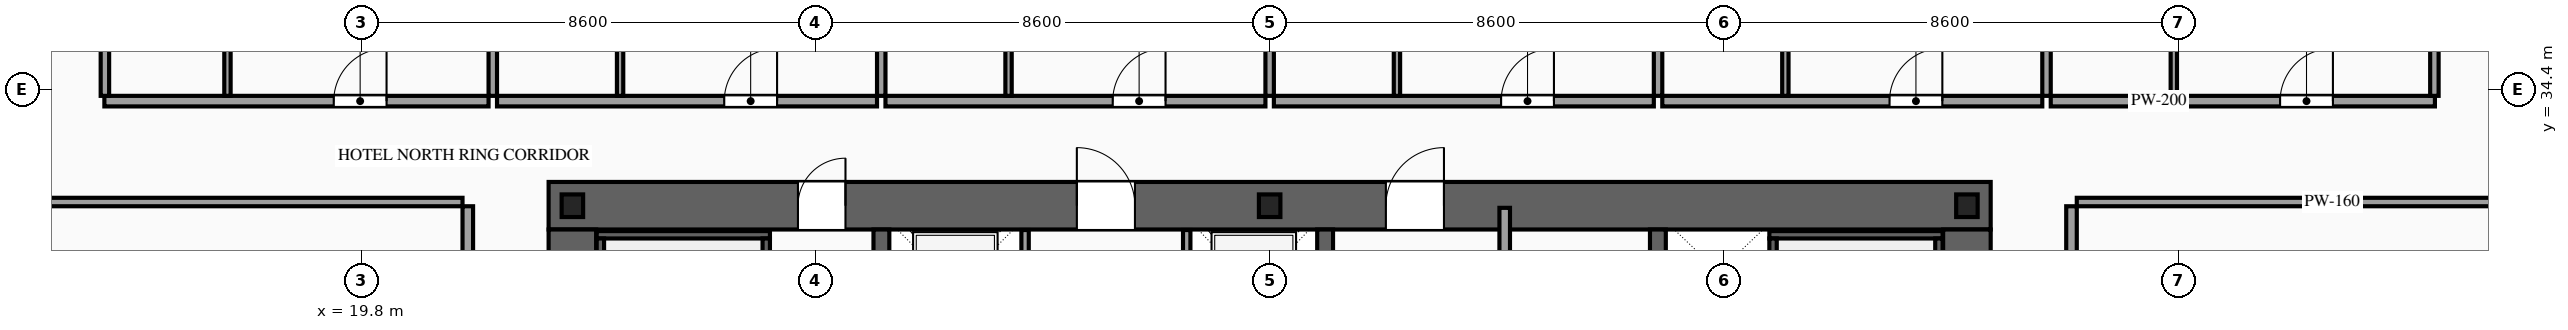
"""IFC4 building model, lengths in metres.
Left out: names, types, materials, properties, quantities, classifications, styles, units other than length and angle.
Written with IfcOpenShell. Run it as: python <this file> out.ifc"""

import sys

from ifc_helpers import new_model, si_unit, direction, frame, frame_2d, origin, origin_2d, place, context, subcontext, project, spatial, rectangle, i_section, extrude, source, transform, mapped, element, fill, save


model = new_model("IFC4")
c1 = context("Model", 3, precision=1e-05, world=origin(), true_north=direction((0.0, 1.0)))
c2 = subcontext(c1, "Body", "Model", "MODEL_VIEW")
j1 = project(units=[si_unit("LENGTHUNIT", "METRE"), si_unit("PLANEANGLEUNIT", "RADIAN")], contexts=[c1])
p1 = place(None, origin())
s1 = spatial("IfcSite", under=j1, at=p1, CompositionType="ELEMENT")
p2 = place(p1, origin())
s2 = spatial("IfcBuilding", under=s1, at=p2, CompositionType="ELEMENT")
p3 = place(p2, frame((0.0, 0.0, 34.2)))
s3 = spatial("IfcBuildingStorey", under=s2, at=p3, CompositionType="ELEMENT", Elevation=34.2)
p4 = place(p3, frame((23.35, 32.2, 0.0), z_axis=(0.0, 0.0, 1.0), x_axis=(1.0, 0.0, 0.0)))
e1 = element("IfcWall", 1, at=p4, inside=s3, PredefinedType="SHEAR", context=c2, shape_type="SweptSolid", body=[
    extrude(rectangle(XDim=27.3, YDim=0.9, at=frame_2d((13.65, 0.0))), origin(), (0.0, 0.0, 1.0), 3.6),
])
p5 = place(p4, frame((4.72, 0.0, 0.0)))
e2 = element("IfcOpeningElement", 2, at=p5, cuts=e1, PredefinedType="OPENING", context=c2, shape_type="SweptSolid", body=[
    extrude(rectangle(XDim=0.9, YDim=2.15, at=frame_2d((0.45, 1.075))), frame((0.0, 0.465, 0.0), z_axis=(0.0, -1.0, 0.0), x_axis=(1.0, 0.0, 0.0)), (0.0, 0.0, 1.0), 0.93),
])
p6 = place(p4, frame((10.0, 0.0, 0.0)))
e3 = element("IfcOpeningElement", 3, at=p6, cuts=e1, PredefinedType="OPENING", context=c2, shape_type="SweptSolid", body=[
    extrude(rectangle(XDim=1.1, YDim=2.2, at=frame_2d((0.55, 1.1))), frame((0.0, 0.465, 0.0), z_axis=(0.0, -1.0, 0.0), x_axis=(1.0, 0.0, 0.0)), (0.0, 0.0, 1.0), 0.93),
])
p7 = place(p4, frame((15.85, 0.0, 0.0)))
e4 = element("IfcOpeningElement", 4, at=p7, cuts=e1, PredefinedType="OPENING", context=c2, shape_type="SweptSolid", body=[
    extrude(rectangle(XDim=1.1, YDim=2.2, at=frame_2d((0.55, 1.1))), frame((0.0, 0.465, 0.0), z_axis=(0.0, -1.0, 0.0), x_axis=(1.0, 0.0, 0.0)), (0.0, 0.0, 1.0), 0.93),
])
m1 = source(origin(), c2, "Body", "SweptSolid", [
    extrude(rectangle(XDim=11.9, YDim=0.9, at=frame_2d((5.95, 0.0))), origin(), (0.0, 0.0, 1.0), 3.6),
])
for number, where, z_axis, x_axis in (
    (5, (23.8, 19.85, 0.0), (0.0, 0.0, 1.0), (0.0, 1.0, 0.0)),
    (6, (50.2, 19.85, 0.0), (0.0, 0.0, 1.0), (0.0, 1.0, 0.0)),
):
    element("IfcWall", number, at=place(p3, frame(where, z_axis=z_axis, x_axis=x_axis)), inside=s3, PredefinedType="SHEAR", context=c2, shape_type="MappedRepresentation", body=[
        mapped(m1, transform((0.0, 0.0, 0.0), scale=1.0)),
    ])
m2 = source(origin(), c2, "Body", "SweptSolid", [
    extrude(rectangle(XDim=11.9, YDim=0.3, at=frame_2d((5.95, 0.0))), origin(), (0.0, 0.0, 1.0), 3.6),
])
for number, where, z_axis, x_axis in (
    (7, (29.65, 19.85, 0.0), (0.0, 0.0, 1.0), (0.0, 1.0, 0.0)),
    (8, (38.05, 19.85, 0.0), (0.0, 0.0, 1.0), (0.0, 1.0, 0.0)),
    (9, (44.35, 19.85, 0.0), (0.0, 0.0, 1.0), (0.0, 1.0, 0.0)),
):
    element("IfcWall", number, at=place(p3, frame(where, z_axis=z_axis, x_axis=x_axis)), inside=s3, PredefinedType="SOLIDWALL", context=c2, shape_type="MappedRepresentation", body=[
        mapped(m2, transform((0.0, 0.0, 0.0), scale=1.0)),
    ])
m3 = source(origin(), c2, "Body", "SweptSolid", [
    extrude(i_section(OverallWidth=0.407, OverallDepth=0.428, WebThickness=0.02, FlangeThickness=0.035, at=origin_2d()), origin(), (0.0, 0.0, 1.0), 3.6),
])
for number, where, z_axis, x_axis in (
    (10, (23.8, 32.2, 0.0), (0.0, 0.0, 1.0), (1.0, 0.0, 0.0)),
    (11, (37.0, 32.2, 0.0), (0.0, 0.0, 1.0), (1.0, 0.0, 0.0)),
    (12, (50.2, 32.2, 0.0), (0.0, 0.0, 1.0), (1.0, 0.0, 0.0)),
):
    element("IfcColumn", number, at=place(p3, frame(where, z_axis=z_axis, x_axis=x_axis)), inside=s3, PredefinedType="COLUMN", context=c2, shape_type="MappedRepresentation", body=[
        mapped(m3, transform((0.0, 0.0, 0.0), scale=1.0)),
    ])
p8 = place(p3, frame((32.37, 29.4, 0.0), z_axis=(0.0, 0.0, 1.0), x_axis=(0.0, 1.0, 0.0)))
e13 = element("IfcWall", 13, at=p8, inside=s3, PredefinedType="SOLIDWALL", context=c2, shape_type="SweptSolid", body=[
    extrude(rectangle(XDim=2.34, YDim=0.14, at=frame_2d((1.17, 0.0))), origin(), (0.0, 0.0, 1.0), 3.38),
])
p9 = place(p8, frame((0.62, 0.0, 0.0)))
e14 = element("IfcOpeningElement", 14, at=p9, cuts=e13, PredefinedType="OPENING", context=c2, shape_type="SweptSolid", body=[
    extrude(rectangle(XDim=1.1, YDim=2.2, at=frame_2d((0.55, 1.1))), frame((0.0, 0.085, 0.0), z_axis=(0.0, -1.0, 0.0), x_axis=(1.0, 0.0, 0.0)), (0.0, 0.0, 1.0), 0.17),
])
p10 = place(p3, frame((35.43, 29.4, 0.0), z_axis=(0.0, 0.0, 1.0), x_axis=(0.0, 1.0, 0.0)))
e15 = element("IfcWall", 15, at=p10, inside=s3, PredefinedType="SOLIDWALL", context=c2, shape_type="SweptSolid", body=[
    extrude(rectangle(XDim=2.34, YDim=0.14, at=frame_2d((1.17, 0.0))), origin(), (0.0, 0.0, 1.0), 3.38),
])
p11 = place(p10, frame((0.62, 0.0, 0.0)))
e16 = element("IfcOpeningElement", 16, at=p11, cuts=e15, PredefinedType="OPENING", context=c2, shape_type="SweptSolid", body=[
    extrude(rectangle(XDim=1.1, YDim=2.2, at=frame_2d((0.55, 1.1))), frame((0.0, 0.085, 0.0), z_axis=(0.0, -1.0, 0.0), x_axis=(1.0, 0.0, 0.0)), (0.0, 0.0, 1.0), 0.17),
])
m4 = source(origin(), c2, "Body", "SweptSolid", [
    extrude(rectangle(XDim=3.28, YDim=0.14, at=frame_2d((1.64, 0.0))), origin(), (0.0, 0.0, 1.0), 3.38),
])
p12 = place(p3, frame((24.26, 31.65, 0.0), z_axis=(0.0, 0.0, 1.0), x_axis=(1.0, 0.0, 0.0)))
e17 = element("IfcWall", 17, at=p12, inside=s3, PredefinedType="SOLIDWALL", context=c2, shape_type="MappedRepresentation", body=[
    mapped(m4, transform((0.0, 0.0, 0.0), scale=1.0)),
])
m5 = source(origin(), c2, "Body", "SweptSolid", [
    extrude(rectangle(XDim=8.94, YDim=0.14, at=frame_2d((4.47, 0.0))), origin(), (0.0, 0.0, 1.0), 3.38),
])
for number, where, z_axis, x_axis in (
    (18, (24.33, 22.64, 0.0), (0.0, 0.0, 1.0), (0.0, 1.0, 0.0)),
    (19, (27.47, 22.64, 0.0), (0.0, 0.0, 1.0), (0.0, 1.0, 0.0)),
):
    element("IfcWall", number, at=place(p3, frame(where, z_axis=z_axis, x_axis=x_axis)), inside=s3, PredefinedType="SOLIDWALL", context=c2, shape_type="MappedRepresentation", body=[
        mapped(m5, transform((0.0, 0.0, 0.0), scale=1.0)),
    ])
p13 = place(p3, frame((46.46, 31.65, 0.0), z_axis=(0.0, 0.0, 1.0), x_axis=(1.0, 0.0, 0.0)))
e20 = element("IfcWall", 20, at=p13, inside=s3, PredefinedType="SOLIDWALL", context=c2, shape_type="MappedRepresentation", body=[
    mapped(m4, transform((0.0, 0.0, 0.0), scale=1.0)),
])
for number, where, z_axis, x_axis in (
    (21, (46.53, 22.64, 0.0), (0.0, 0.0, 1.0), (0.0, 1.0, 0.0)),
    (22, (49.67, 22.64, 0.0), (0.0, 0.0, 1.0), (0.0, 1.0, 0.0)),
):
    element("IfcWall", number, at=place(p3, frame(where, z_axis=z_axis, x_axis=x_axis)), inside=s3, PredefinedType="SOLIDWALL", context=c2, shape_type="MappedRepresentation", body=[
        mapped(m5, transform((0.0, 0.0, 0.0), scale=1.0)),
    ])
m6 = source(origin(), c2, "Body", "SweptSolid", [
    extrude(rectangle(XDim=12.72, YDim=0.2, at=frame_2d((6.36, 0.0))), origin(), (0.0, 0.0, 1.0), 3.38),
])
p14 = place(p3, frame((41.45, 19.44, 0.0), z_axis=(0.0, 0.0, 1.0), x_axis=(0.0, 1.0, 0.0)))
e23 = element("IfcWall", 23, at=p14, inside=s3, PredefinedType="PARTITIONING", context=c2, shape_type="MappedRepresentation", body=[
    mapped(m6, transform((0.0, 0.0, 0.0), scale=1.0)),
])
p15 = place(p3, frame((14.94, 34.18, 0.0), z_axis=(0.0, 0.0, 1.0), x_axis=(1.0, 0.0, 0.0)))
e24 = element("IfcWall", 24, at=p15, inside=s3, PredefinedType="PARTITIONING", context=c2, shape_type="SweptSolid", body=[
    extrude(rectangle(XDim=7.273, YDim=0.2, at=frame_2d((3.636, 0.0))), origin(), (0.0, 0.0, 1.0), 3.38),
])
p16 = place(p15, frame((4.342, 0.0, 0.0)))
e25 = element("IfcOpeningElement", 25, at=p16, cuts=e24, PredefinedType="OPENING", context=c2, shape_type="SweptSolid", body=[
    extrude(rectangle(XDim=1.0, YDim=2.2, at=frame_2d((0.5, 1.1))), frame((0.0, 0.115, 0.0), z_axis=(0.0, -1.0, 0.0), x_axis=(1.0, 0.0, 0.0)), (0.0, 0.0, 1.0), 0.23),
])
m7 = source(origin(), c2, "Body", "SweptSolid", [
    extrude(rectangle(XDim=16.47, YDim=0.16, at=frame_2d((8.235, 0.0))), origin(), (0.0, 0.0, 1.0), 3.38),
])
p17 = place(p3, frame((22.293, 34.28, 0.0), z_axis=(0.0, 0.0, 1.0), x_axis=(0.0, 1.0, 0.0)))
e26 = element("IfcWall", 26, at=p17, inside=s3, PredefinedType="PARTITIONING", context=c2, shape_type="MappedRepresentation", body=[
    mapped(m7, transform((0.0, 0.0, 0.0), scale=1.0)),
])
m8 = source(origin(), c2, "Body", "SweptSolid", [
    extrude(rectangle(XDim=2.42, YDim=0.12, at=frame_2d((1.21, 0.0))), origin(), (0.0, 0.0, 1.0), 3.38),
])
p18 = place(p3, frame((17.27, 34.28, 0.0), z_axis=(0.0, 0.0, 1.0), x_axis=(0.0, 1.0, 0.0)))
e27 = element("IfcWall", 27, at=p18, inside=s3, PredefinedType="PARTITIONING", context=c2, shape_type="MappedRepresentation", body=[
    mapped(m8, transform((0.0, 0.0, 0.0), scale=1.0)),
])
p19 = place(p3, frame((22.373, 34.18, 0.0), z_axis=(0.0, 0.0, 1.0), x_axis=(1.0, 0.0, 0.0)))
e28 = element("IfcWall", 28, at=p19, inside=s3, PredefinedType="PARTITIONING", context=c2, shape_type="SweptSolid", body=[
    extrude(rectangle(XDim=7.194, YDim=0.2, at=frame_2d((3.597, 0.0))), origin(), (0.0, 0.0, 1.0), 3.38),
])
p20 = place(p19, frame((4.302, 0.0, 0.0)))
e29 = element("IfcOpeningElement", 29, at=p20, cuts=e28, PredefinedType="OPENING", context=c2, shape_type="SweptSolid", body=[
    extrude(rectangle(XDim=1.0, YDim=2.2, at=frame_2d((0.5, 1.1))), frame((0.0, 0.115, 0.0), z_axis=(0.0, -1.0, 0.0), x_axis=(1.0, 0.0, 0.0)), (0.0, 0.0, 1.0), 0.23),
])
p21 = place(p3, frame((29.647, 34.28, 0.0), z_axis=(0.0, 0.0, 1.0), x_axis=(0.0, 1.0, 0.0)))
e30 = element("IfcWall", 30, at=p21, inside=s3, PredefinedType="PARTITIONING", context=c2, shape_type="MappedRepresentation", body=[
    mapped(m7, transform((0.0, 0.0, 0.0), scale=1.0)),
])
p22 = place(p3, frame((24.703, 34.28, 0.0), z_axis=(0.0, 0.0, 1.0), x_axis=(0.0, 1.0, 0.0)))
e31 = element("IfcWall", 31, at=p22, inside=s3, PredefinedType="PARTITIONING", context=c2, shape_type="MappedRepresentation", body=[
    mapped(m8, transform((0.0, 0.0, 0.0), scale=1.0)),
])
p23 = place(p3, frame((29.727, 34.18, 0.0), z_axis=(0.0, 0.0, 1.0), x_axis=(1.0, 0.0, 0.0)))
e32 = element("IfcWall", 32, at=p23, inside=s3, PredefinedType="PARTITIONING", context=c2, shape_type="SweptSolid", body=[
    extrude(rectangle(XDim=7.193, YDim=0.2, at=frame_2d((3.596, 0.0))), origin(), (0.0, 0.0, 1.0), 3.38),
])
p24 = place(p23, frame((4.302, 0.0, 0.0)))
e33 = element("IfcOpeningElement", 33, at=p24, cuts=e32, PredefinedType="OPENING", context=c2, shape_type="SweptSolid", body=[
    extrude(rectangle(XDim=1.0, YDim=2.2, at=frame_2d((0.5, 1.1))), frame((0.0, 0.115, 0.0), z_axis=(0.0, -1.0, 0.0), x_axis=(1.0, 0.0, 0.0)), (0.0, 0.0, 1.0), 0.23),
])
m9 = source(origin(), c2, "Body", "SweptSolid", [
    extrude(rectangle(XDim=16.47, YDim=0.16, at=frame_2d((8.235, 0.0))), origin(), (0.0, 0.0, 1.0), 2.575),
])
p25 = place(p3, frame((37.0, 34.28, 0.0), z_axis=(0.0, 0.0, 1.0), x_axis=(0.0, 1.0, 0.0)))
e34 = element("IfcWall", 34, at=p25, inside=s3, PredefinedType="PARTITIONING", context=c2, shape_type="MappedRepresentation", body=[
    mapped(m9, transform((0.0, 0.0, 0.0), scale=1.0)),
])
p26 = place(p3, frame((32.057, 34.28, 0.0), z_axis=(0.0, 0.0, 1.0), x_axis=(0.0, 1.0, 0.0)))
e35 = element("IfcWall", 35, at=p26, inside=s3, PredefinedType="PARTITIONING", context=c2, shape_type="MappedRepresentation", body=[
    mapped(m8, transform((0.0, 0.0, 0.0), scale=1.0)),
])
p27 = place(p3, frame((37.08, 34.18, 0.0), z_axis=(0.0, 0.0, 1.0), x_axis=(1.0, 0.0, 0.0)))
e36 = element("IfcWall", 36, at=p27, inside=s3, PredefinedType="PARTITIONING", context=c2, shape_type="SweptSolid", body=[
    extrude(rectangle(XDim=7.193, YDim=0.2, at=frame_2d((3.596, 0.0))), origin(), (0.0, 0.0, 1.0), 3.38),
])
p28 = place(p27, frame((4.302, 0.0, 0.0)))
e37 = element("IfcOpeningElement", 37, at=p28, cuts=e36, PredefinedType="OPENING", context=c2, shape_type="SweptSolid", body=[
    extrude(rectangle(XDim=1.0, YDim=2.2, at=frame_2d((0.5, 1.1))), frame((0.0, 0.115, 0.0), z_axis=(0.0, -1.0, 0.0), x_axis=(1.0, 0.0, 0.0)), (0.0, 0.0, 1.0), 0.23),
])
p29 = place(p3, frame((44.353, 34.28, 0.0), z_axis=(0.0, 0.0, 1.0), x_axis=(0.0, 1.0, 0.0)))
e38 = element("IfcWall", 38, at=p29, inside=s3, PredefinedType="PARTITIONING", context=c2, shape_type="MappedRepresentation", body=[
    mapped(m7, transform((0.0, 0.0, 0.0), scale=1.0)),
])
p30 = place(p3, frame((39.41, 34.28, 0.0), z_axis=(0.0, 0.0, 1.0), x_axis=(0.0, 1.0, 0.0)))
e39 = element("IfcWall", 39, at=p30, inside=s3, PredefinedType="PARTITIONING", context=c2, shape_type="MappedRepresentation", body=[
    mapped(m8, transform((0.0, 0.0, 0.0), scale=1.0)),
])
p31 = place(p3, frame((44.433, 34.18, 0.0), z_axis=(0.0, 0.0, 1.0), x_axis=(1.0, 0.0, 0.0)))
e40 = element("IfcWall", 40, at=p31, inside=s3, PredefinedType="PARTITIONING", context=c2, shape_type="SweptSolid", body=[
    extrude(rectangle(XDim=7.194, YDim=0.2, at=frame_2d((3.597, 0.0))), origin(), (0.0, 0.0, 1.0), 3.38),
])
p32 = place(p31, frame((4.302, 0.0, 0.0)))
e41 = element("IfcOpeningElement", 41, at=p32, cuts=e40, PredefinedType="OPENING", context=c2, shape_type="SweptSolid", body=[
    extrude(rectangle(XDim=1.0, YDim=2.2, at=frame_2d((0.5, 1.1))), frame((0.0, 0.115, 0.0), z_axis=(0.0, -1.0, 0.0), x_axis=(1.0, 0.0, 0.0)), (0.0, 0.0, 1.0), 0.23),
])
p33 = place(p3, frame((51.707, 34.28, 0.0), z_axis=(0.0, 0.0, 1.0), x_axis=(0.0, 1.0, 0.0)))
e42 = element("IfcWall", 42, at=p33, inside=s3, PredefinedType="PARTITIONING", context=c2, shape_type="MappedRepresentation", body=[
    mapped(m7, transform((0.0, 0.0, 0.0), scale=1.0)),
])
p34 = place(p3, frame((46.763, 34.28, 0.0), z_axis=(0.0, 0.0, 1.0), x_axis=(0.0, 1.0, 0.0)))
e43 = element("IfcWall", 43, at=p34, inside=s3, PredefinedType="PARTITIONING", context=c2, shape_type="MappedRepresentation", body=[
    mapped(m8, transform((0.0, 0.0, 0.0), scale=1.0)),
])
p35 = place(p3, frame((51.787, 34.18, 0.0), z_axis=(0.0, 0.0, 1.0), x_axis=(1.0, 0.0, 0.0)))
e44 = element("IfcWall", 44, at=p35, inside=s3, PredefinedType="PARTITIONING", context=c2, shape_type="SweptSolid", body=[
    extrude(rectangle(XDim=7.273, YDim=0.2, at=frame_2d((3.636, 0.0))), origin(), (0.0, 0.0, 1.0), 3.38),
])
p36 = place(p35, frame((4.342, 0.0, 0.0)))
e45 = element("IfcOpeningElement", 45, at=p36, cuts=e44, PredefinedType="OPENING", context=c2, shape_type="SweptSolid", body=[
    extrude(rectangle(XDim=1.0, YDim=2.2, at=frame_2d((0.5, 1.1))), frame((0.0, 0.115, 0.0), z_axis=(0.0, -1.0, 0.0), x_axis=(1.0, 0.0, 0.0)), (0.0, 0.0, 1.0), 0.23),
])
m10 = source(origin(), c2, "Body", "SweptSolid", [
    extrude(rectangle(XDim=16.32, YDim=0.16, at=frame_2d((8.16, 0.0))), origin(), (0.0, 0.0, 1.0), 3.38),
])
for number, where, z_axis, x_axis in (
    (46, (14.95, 34.28, 0.0), (0.0, 0.0, 1.0), (0.0, 1.0, 0.0)),
    (47, (59.05, 34.28, 0.0), (0.0, 0.0, 1.0), (0.0, 1.0, 0.0)),
):
    element("IfcWall", number, at=place(p3, frame(where, z_axis=z_axis, x_axis=x_axis)), inside=s3, PredefinedType="PARTITIONING", context=c2, shape_type="MappedRepresentation", body=[
        mapped(m10, transform((0.0, 0.0, 0.0), scale=1.0)),
    ])
p37 = place(p3, frame((54.117, 34.28, 0.0), z_axis=(0.0, 0.0, 1.0), x_axis=(0.0, 1.0, 0.0)))
e48 = element("IfcWall", 48, at=p37, inside=s3, PredefinedType="PARTITIONING", context=c2, shape_type="MappedRepresentation", body=[
    mapped(m8, transform((0.0, 0.0, 0.0), scale=1.0)),
])
p38 = place(p3, frame((21.82, 25.88, 0.0), z_axis=(0.0, 0.0, 1.0), x_axis=(0.0, 1.0, 0.0)))
e49 = element("IfcWall", 49, at=p38, inside=s3, PredefinedType="PARTITIONING", context=c2, shape_type="SweptSolid", body=[
    extrude(rectangle(XDim=6.31, YDim=0.2, at=frame_2d((3.155, 0.0))), origin(), (0.0, 0.0, 1.0), 3.38),
])
p39 = place(p38, frame((3.835, 0.0, 0.0)))
e50 = element("IfcOpeningElement", 50, at=p39, cuts=e49, PredefinedType="OPENING", context=c2, shape_type="SweptSolid", body=[
    extrude(rectangle(XDim=1.0, YDim=2.2, at=frame_2d((0.5, 1.1))), frame((0.0, 0.115, 0.0), z_axis=(0.0, -1.0, 0.0), x_axis=(1.0, 0.0, 0.0)), (0.0, 0.0, 1.0), 0.23),
])
m11 = source(origin(), c2, "Body", "SweptSolid", [
    extrude(rectangle(XDim=9.67, YDim=0.16, at=frame_2d((4.835, 0.0))), origin(), (0.0, 0.0, 1.0), 2.875),
])
p40 = place(p3, frame((12.05, 32.27, 0.0), z_axis=(0.0, 0.0, 1.0), x_axis=(1.0, 0.0, 0.0)))
e51 = element("IfcWall", 51, at=p40, inside=s3, PredefinedType="PARTITIONING", context=c2, shape_type="MappedRepresentation", body=[
    mapped(m11, transform((0.0, 0.0, 0.0), scale=1.0)),
])
p41 = place(p3, frame((52.18, 25.88, 0.0), z_axis=(0.0, 0.0, 1.0), x_axis=(0.0, 1.0, 0.0)))
e52 = element("IfcWall", 52, at=p41, inside=s3, PredefinedType="PARTITIONING", context=c2, shape_type="SweptSolid", body=[
    extrude(rectangle(XDim=6.31, YDim=0.2, at=frame_2d((3.155, 0.0))), origin(), (0.0, 0.0, 1.0), 3.38),
])
p42 = place(p41, frame((3.835, 0.0, 0.0)))
e53 = element("IfcOpeningElement", 53, at=p42, cuts=e52, PredefinedType="OPENING", context=c2, shape_type="SweptSolid", body=[
    extrude(rectangle(XDim=1.0, YDim=2.2, at=frame_2d((0.5, 1.1))), frame((0.0, 0.115, 0.0), z_axis=(0.0, -1.0, 0.0), x_axis=(1.0, 0.0, 0.0)), (0.0, 0.0, 1.0), 0.23),
])
p43 = place(p3, frame((52.28, 32.27, 0.0), z_axis=(0.0, 0.0, 1.0), x_axis=(1.0, 0.0, 0.0)))
e54 = element("IfcWall", 54, at=p43, inside=s3, PredefinedType="PARTITIONING", context=c2, shape_type="MappedRepresentation", body=[
    mapped(m11, transform((0.0, 0.0, 0.0), scale=1.0)),
])
m12 = source(origin(), c2, "Body", "SweptSolid", [
    extrude(rectangle(XDim=0.9, YDim=2.15, at=frame_2d((0.45, 1.075))), frame((0.0, 0.025, 0.0), z_axis=(0.0, -1.0, 0.0), x_axis=(1.0, 0.0, 0.0)), (0.0, 0.0, 1.0), 0.05),
])
p44 = place(p5, origin())
e55 = element("IfcDoor", 55, at=p44, inside=s3, OperationType="SINGLE_SWING_RIGHT", PredefinedType="DOOR", context=c2, shape_type="MappedRepresentation", body=[
    mapped(m12, transform((0.0, 0.0, 0.0), scale=1.0)),
])
fill(e2, e55)
m13 = source(origin(), c2, "Body", "SweptSolid", [
    extrude(rectangle(XDim=1.1, YDim=2.2, at=frame_2d((0.55, 1.1))), frame((0.0, 0.025, 0.0), z_axis=(0.0, -1.0, 0.0), x_axis=(1.0, 0.0, 0.0)), (0.0, 0.0, 1.0), 0.05),
])
p45 = place(p6, origin())
e56 = element("IfcDoor", 56, at=p45, inside=s3, OperationType="SINGLE_SWING_LEFT", PredefinedType="DOOR", context=c2, shape_type="MappedRepresentation", body=[
    mapped(m13, transform((0.0, 0.0, 0.0), scale=1.0)),
])
fill(e3, e56)
p46 = place(p7, origin())
e57 = element("IfcDoor", 57, at=p46, inside=s3, OperationType="SINGLE_SWING_RIGHT", PredefinedType="DOOR", context=c2, shape_type="MappedRepresentation", body=[
    mapped(m13, transform((0.0, 0.0, 0.0), scale=1.0)),
])
fill(e4, e57)
m14 = source(origin(), c2, "Body", "SweptSolid", [
    extrude(rectangle(XDim=1.0, YDim=2.2, at=frame_2d((0.5, 1.1))), frame((0.0, 0.025, 0.0), z_axis=(0.0, -1.0, 0.0), x_axis=(1.0, 0.0, 0.0)), (0.0, 0.0, 1.0), 0.05),
])
p47 = place(p16, origin())
e58 = element("IfcDoor", 58, at=p47, inside=s3, OperationType="SINGLE_SWING_RIGHT", PredefinedType="DOOR", context=c2, shape_type="MappedRepresentation", body=[
    mapped(m14, transform((0.0, 0.0, 0.0), scale=1.0)),
])
fill(e25, e58)
p48 = place(p20, origin())
e59 = element("IfcDoor", 59, at=p48, inside=s3, OperationType="SINGLE_SWING_RIGHT", PredefinedType="DOOR", context=c2, shape_type="MappedRepresentation", body=[
    mapped(m14, transform((0.0, 0.0, 0.0), scale=1.0)),
])
fill(e29, e59)
p49 = place(p24, origin())
e60 = element("IfcDoor", 60, at=p49, inside=s3, OperationType="SINGLE_SWING_RIGHT", PredefinedType="DOOR", context=c2, shape_type="MappedRepresentation", body=[
    mapped(m14, transform((0.0, 0.0, 0.0), scale=1.0)),
])
fill(e33, e60)
p50 = place(p28, origin())
e61 = element("IfcDoor", 61, at=p50, inside=s3, OperationType="SINGLE_SWING_RIGHT", PredefinedType="DOOR", context=c2, shape_type="MappedRepresentation", body=[
    mapped(m14, transform((0.0, 0.0, 0.0), scale=1.0)),
])
fill(e37, e61)
p51 = place(p32, origin())
e62 = element("IfcDoor", 62, at=p51, inside=s3, OperationType="SINGLE_SWING_RIGHT", PredefinedType="DOOR", context=c2, shape_type="MappedRepresentation", body=[
    mapped(m14, transform((0.0, 0.0, 0.0), scale=1.0)),
])
fill(e41, e62)
p52 = place(p36, origin())
e63 = element("IfcDoor", 63, at=p52, inside=s3, OperationType="SINGLE_SWING_RIGHT", PredefinedType="DOOR", context=c2, shape_type="MappedRepresentation", body=[
    mapped(m14, transform((0.0, 0.0, 0.0), scale=1.0)),
])
fill(e45, e63)
save(model, sys.argv[1])
